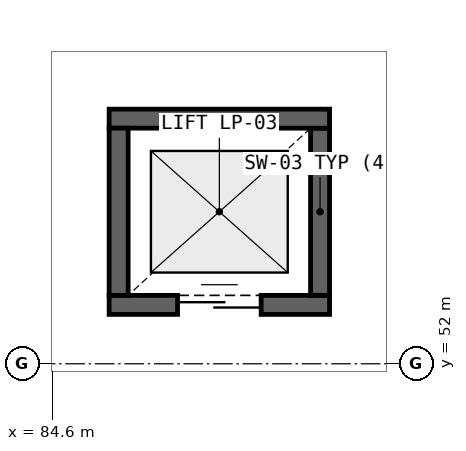
"""IFC4 building model, lengths in metres.
Left out: names, types, materials, properties, quantities, classifications, styles, units other than length and angle.
Written with IfcOpenShell. Run it as: python <this file> out.ifc"""

import sys

from ifc_helpers import new_model, si_unit, direction, frame, frame_2d, origin, place, context, subcontext, project, spatial, rectangle, extrude, element, fill, save


model = new_model("IFC4")
c1 = context("Model", 3, precision=1e-05, world=origin(), true_north=direction((0.0, 1.0)))
c2 = subcontext(c1, "Body", "Model", "MODEL_VIEW")
j1 = project(units=[si_unit("LENGTHUNIT", "METRE"), si_unit("PLANEANGLEUNIT", "RADIAN")], contexts=[c1])
p1 = place(None, origin())
s1 = spatial("IfcSite", under=j1, at=p1, CompositionType="ELEMENT")
p2 = place(p1, origin())
s2 = spatial("IfcBuilding", under=s1, at=p2, CompositionType="ELEMENT")
p3 = place(p2, frame((0.0, 0.0, 19.2)))
s3 = spatial("IfcBuildingStorey", under=s2, at=p3, CompositionType="ELEMENT", Elevation=19.2)
p4 = place(p3, frame((85.35, 52.775, 0.0), z_axis=(0.0, 0.0, 1.0), x_axis=(1.0, 0.0, 0.0)))
e1 = element("IfcWall", 1, at=p4, inside=s3, PredefinedType="SHEAR", context=c2, shape_type="SweptSolid", body=[
    extrude(rectangle(XDim=2.9, YDim=0.25, at=frame_2d((1.45, 0.0))), origin(), (0.0, 0.0, 1.0), 3.77),
])
p5 = place(p4, frame((0.9, 0.0, 0.0)))
e2 = element("IfcOpeningElement", 2, at=p5, cuts=e1, PredefinedType="OPENING", context=c2, shape_type="SweptSolid", body=[
    extrude(rectangle(XDim=1.1, YDim=2.15, at=frame_2d((0.55, 1.075))), frame((0.0, 0.135, 0.0), z_axis=(0.0, -1.0, 0.0), x_axis=(1.0, 0.0, 0.0)), (0.0, 0.0, 1.0), 0.27),
])
p6 = place(p3, frame((88.125, 52.9, 0.0), z_axis=(0.0, 0.0, 1.0), x_axis=(0.0, 1.0, 0.0)))
e3 = element("IfcWall", 3, at=p6, inside=s3, PredefinedType="SHEAR", context=c2, shape_type="SweptSolid", body=[
    extrude(rectangle(XDim=2.2, YDim=0.25, at=frame_2d((1.1, 0.0))), origin(), (0.0, 0.0, 1.0), 3.77),
])
p7 = place(p3, frame((88.25, 55.225, 0.0), z_axis=(0.0, 0.0, 1.0), x_axis=(-1.0, 0.0, 0.0)))
e4 = element("IfcWall", 4, at=p7, inside=s3, PredefinedType="SHEAR", context=c2, shape_type="SweptSolid", body=[
    extrude(rectangle(XDim=2.9, YDim=0.25, at=frame_2d((1.45, 0.0))), origin(), (0.0, 0.0, 1.0), 3.77),
])
p8 = place(p3, frame((85.475, 55.1, 0.0), z_axis=(0.0, 0.0, 1.0), x_axis=(0.0, -1.0, 0.0)))
e5 = element("IfcWall", 5, at=p8, inside=s3, PredefinedType="SHEAR", context=c2, shape_type="SweptSolid", body=[
    extrude(rectangle(XDim=2.2, YDim=0.25, at=frame_2d((1.1, 0.0))), origin(), (0.0, 0.0, 1.0), 3.77),
])
p9 = place(p5, origin())
e6 = element("IfcDoor", 6, at=p9, inside=s3, OperationType="DOUBLE_DOOR_SLIDING", PredefinedType="DOOR", context=c2, shape_type="SweptSolid", body=[
    extrude(rectangle(XDim=1.1, YDim=2.15, at=frame_2d((0.55, 1.075))), frame((0.0, 0.025, 0.0), z_axis=(0.0, -1.0, 0.0), x_axis=(1.0, 0.0, 0.0)), (0.0, 0.0, 1.0), 0.05),
])
fill(e2, e6)
save(model, sys.argv[1])
